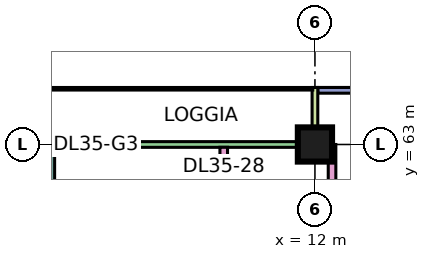
"""IFC4 building model, lengths in metres.
Left out: names, types, materials, properties, quantities, classifications, styles, units other than length and angle.
Written with IfcOpenShell. Run it as: python <this file> out.ifc"""

import sys

from ifc_helpers import new_model, si_unit, direction, frame, frame_2d, origin, origin_2d, place, context, subcontext, project, spatial, rectangle, extrude, element, save


model = new_model("IFC4")
c1 = context("Model", 3, precision=1e-05, world=origin(), true_north=direction((0.0, 1.0)))
c2 = subcontext(c1, "Body", "Model", "MODEL_VIEW")
j1 = project(units=[si_unit("LENGTHUNIT", "METRE"), si_unit("PLANEANGLEUNIT", "RADIAN")], contexts=[c1])
p1 = place(None, origin())
s1 = spatial("IfcSite", under=j1, at=p1, CompositionType="ELEMENT")
p2 = place(p1, origin())
s2 = spatial("IfcBuilding", under=s1, at=p2, CompositionType="ELEMENT")
p3 = place(p2, frame((0.0, 0.0, 157.4)))
s3 = spatial("IfcBuildingStorey", under=s2, at=p3, CompositionType="ELEMENT", Elevation=157.4)
p4 = place(p3, frame((12.0, 63.0, 0.0), z_axis=(0.0, 0.0, 1.0), x_axis=(1.0, 0.0, 0.0)))
e1 = element("IfcColumn", 1, at=p4, inside=s3, PredefinedType="COLUMN", context=c2, shape_type="SweptSolid", body=[
    extrude(rectangle(XDim=0.9, YDim=0.9, at=origin_2d()), origin(), (0.0, 0.0, 1.0), 3.75),
])
p5 = place(p3, frame((22.5, 64.425, 0.0), z_axis=(0.0, 0.0, 1.0), x_axis=(-1.0, 0.0, 0.0)))
e2 = element("IfcWall", 2, at=p5, inside=s3, PredefinedType="SOLIDWALL", context=c2, shape_type="SweptSolid", body=[
    extrude(rectangle(XDim=10.425, YDim=0.15, at=frame_2d((5.212, 0.0))), origin(), (0.0, 0.0, 1.0), 3.35),
])
p6 = place(p5, frame((0.825, 0.0, 0.45)))
e3 = element("IfcOpeningElement", 3, at=p6, cuts=e2, PredefinedType="OPENING", context=c2, shape_type="SweptSolid", body=[
    extrude(rectangle(XDim=3.0, YDim=2.4, at=frame_2d((1.5, 1.2))), frame((0.0, 0.085, 0.0), z_axis=(0.0, -1.0, 0.0), x_axis=(1.0, 0.0, 0.0)), (0.0, 0.0, 1.0), 0.17),
])
p7 = place(p5, frame((5.85, 0.0, 0.45)))
e4 = element("IfcOpeningElement", 4, at=p7, cuts=e2, PredefinedType="OPENING", context=c2, shape_type="SweptSolid", body=[
    extrude(rectangle(XDim=3.0, YDim=2.4, at=frame_2d((1.5, 1.2))), frame((0.0, 0.085, 0.0), z_axis=(0.0, -1.0, 0.0), x_axis=(1.0, 0.0, 0.0)), (0.0, 0.0, 1.0), 0.17),
])
p8 = place(p3, frame((11.925, 63.0, 0.0), z_axis=(0.0, 0.0, 1.0), x_axis=(-1.0, 0.0, 0.0)))
e5 = element("IfcWall", 5, at=p8, inside=s3, PredefinedType="SOLIDWALL", context=c2, shape_type="SweptSolid", body=[
    extrude(rectangle(XDim=10.35, YDim=0.15, at=frame_2d((5.175, 0.0))), origin(), (0.0, 0.0, 1.0), 3.35),
])
p9 = place(p8, frame((7.688, 0.0, 0.0)))
e6 = element("IfcOpeningElement", 6, at=p9, cuts=e5, PredefinedType="OPENING", context=c2, shape_type="SweptSolid", body=[
    extrude(rectangle(XDim=1.8, YDim=2.4, at=frame_2d((0.9, 1.2))), frame((0.0, 0.085, 0.0), z_axis=(0.0, -1.0, 0.0), x_axis=(1.0, 0.0, 0.0)), (0.0, 0.0, 1.0), 0.17),
])
p10 = place(p3, frame((12.0, 64.5, 0.0), z_axis=(0.0, 0.0, 1.0), x_axis=(0.0, -1.0, 0.0)))
e7 = element("IfcWall", 7, at=p10, inside=s3, PredefinedType="SOLIDWALL", context=c2, shape_type="SweptSolid", body=[
    extrude(rectangle(XDim=1.5, YDim=0.15, at=frame_2d((0.75, 0.0))), origin(), (0.0, 0.0, 1.0), 3.35),
])
p11 = place(p3, frame((5.1, 36.1, 0.0), z_axis=(0.0, 0.0, 1.0), x_axis=(0.0, 1.0, 0.0)))
e8 = element("IfcWall", 8, at=p11, inside=s3, PredefinedType="PARTITIONING", context=c2, shape_type="SweptSolid", body=[
    extrude(rectangle(XDim=26.826, YDim=0.1, at=frame_2d((13.413, 0.0))), origin(), (0.0, 0.0, 1.0), 3.35),
])
p12 = place(p11, frame((0.95, 0.0, 0.0)))
e9 = element("IfcOpeningElement", 9, at=p12, cuts=e8, PredefinedType="OPENING", context=c2, shape_type="SweptSolid", body=[
    extrude(rectangle(XDim=0.9, YDim=2.1, at=frame_2d((0.45, 1.05))), frame((0.0, 0.06, 0.0), z_axis=(0.0, -1.0, 0.0), x_axis=(1.0, 0.0, 0.0)), (0.0, 0.0, 1.0), 0.12),
])
p13 = place(p11, frame((3.95, 0.0, 0.0)))
e10 = element("IfcOpeningElement", 10, at=p13, cuts=e8, PredefinedType="OPENING", context=c2, shape_type="SweptSolid", body=[
    extrude(rectangle(XDim=0.9, YDim=2.1, at=frame_2d((0.45, 1.05))), frame((0.0, 0.06, 0.0), z_axis=(0.0, -1.0, 0.0), x_axis=(1.0, 0.0, 0.0)), (0.0, 0.0, 1.0), 0.12),
])
p14 = place(p11, frame((6.95, 0.0, 0.0)))
e11 = element("IfcOpeningElement", 11, at=p14, cuts=e8, PredefinedType="OPENING", context=c2, shape_type="SweptSolid", body=[
    extrude(rectangle(XDim=0.9, YDim=2.1, at=frame_2d((0.45, 1.05))), frame((0.0, 0.06, 0.0), z_axis=(0.0, -1.0, 0.0), x_axis=(1.0, 0.0, 0.0)), (0.0, 0.0, 1.0), 0.12),
])
p15 = place(p11, frame((9.95, 0.0, 0.0)))
e12 = element("IfcOpeningElement", 12, at=p15, cuts=e8, PredefinedType="OPENING", context=c2, shape_type="SweptSolid", body=[
    extrude(rectangle(XDim=0.9, YDim=2.1, at=frame_2d((0.45, 1.05))), frame((0.0, 0.06, 0.0), z_axis=(0.0, -1.0, 0.0), x_axis=(1.0, 0.0, 0.0)), (0.0, 0.0, 1.0), 0.12),
])
p16 = place(p11, frame((21.95, 0.0, 0.0)))
e13 = element("IfcOpeningElement", 13, at=p16, cuts=e8, PredefinedType="OPENING", context=c2, shape_type="SweptSolid", body=[
    extrude(rectangle(XDim=0.9, YDim=2.1, at=frame_2d((0.45, 1.05))), frame((0.0, 0.06, 0.0), z_axis=(0.0, -1.0, 0.0), x_axis=(1.0, 0.0, 0.0)), (0.0, 0.0, 1.0), 0.12),
])
p17 = place(p11, frame((15.95, 0.0, 0.0)))
e14 = element("IfcOpeningElement", 14, at=p17, cuts=e8, PredefinedType="OPENING", context=c2, shape_type="SweptSolid", body=[
    extrude(rectangle(XDim=0.9, YDim=2.1, at=frame_2d((0.45, 1.05))), frame((0.0, 0.06, 0.0), z_axis=(0.0, -1.0, 0.0), x_axis=(1.0, 0.0, 0.0)), (0.0, 0.0, 1.0), 0.12),
])
p18 = place(p11, frame((24.95, 0.0, 0.0)))
e15 = element("IfcOpeningElement", 15, at=p18, cuts=e8, PredefinedType="OPENING", context=c2, shape_type="SweptSolid", body=[
    extrude(rectangle(XDim=0.9, YDim=2.1, at=frame_2d((0.45, 1.05))), frame((0.0, 0.06, 0.0), z_axis=(0.0, -1.0, 0.0), x_axis=(1.0, 0.0, 0.0)), (0.0, 0.0, 1.0), 0.12),
])
p19 = place(p3, frame((9.6, 20.0, 0.0), z_axis=(0.0, 0.0, 1.0), x_axis=(0.0, 1.0, 0.0)))
e16 = element("IfcWall", 16, at=p19, inside=s3, PredefinedType="PARTITIONING", context=c2, shape_type="SweptSolid", body=[
    extrude(rectangle(XDim=42.926, YDim=0.2, at=frame_2d((21.463, 0.0))), origin(), (0.0, 0.0, 1.0), 3.35),
])
p20 = place(p19, frame((40.8, 0.0, 0.0)))
e17 = element("IfcOpeningElement", 17, at=p20, cuts=e16, PredefinedType="OPENING", context=c2, shape_type="SweptSolid", body=[
    extrude(rectangle(XDim=1.0, YDim=2.1, at=frame_2d((0.5, 1.05))), frame((0.0, 0.11, 0.0), z_axis=(0.0, -1.0, 0.0), x_axis=(1.0, 0.0, 0.0)), (0.0, 0.0, 1.0), 0.22),
])
p21 = place(p19, frame((0.6, 0.0, 0.0)))
e18 = element("IfcOpeningElement", 18, at=p21, cuts=e16, PredefinedType="OPENING", context=c2, shape_type="SweptSolid", body=[
    extrude(rectangle(XDim=1.2, YDim=2.1, at=frame_2d((0.6, 1.05))), frame((0.0, 0.11, 0.0), z_axis=(0.0, -1.0, 0.0), x_axis=(1.0, 0.0, 0.0)), (0.0, 0.0, 1.0), 0.22),
])
p22 = place(p19, frame((3.9, 0.0, 0.0)))
e19 = element("IfcOpeningElement", 19, at=p22, cuts=e16, PredefinedType="OPENING", context=c2, shape_type="SweptSolid", body=[
    extrude(rectangle(XDim=1.0, YDim=2.1, at=frame_2d((0.5, 1.05))), frame((0.0, 0.11, 0.0), z_axis=(0.0, -1.0, 0.0), x_axis=(1.0, 0.0, 0.0)), (0.0, 0.0, 1.0), 0.22),
])
p23 = place(p3, frame((12.45, 20.0, 0.0), z_axis=(0.0, 0.0, 1.0), x_axis=(0.0, 1.0, 0.0)))
e20 = element("IfcWall", 20, at=p23, inside=s3, PredefinedType="PARTITIONING", context=c2, shape_type="SweptSolid", body=[
    extrude(rectangle(XDim=43.0, YDim=0.2, at=frame_2d((21.5, 0.0))), origin(), (0.0, 0.0, 1.0), 3.35),
])
p24 = place(p23, frame((5.95, 0.0, 0.0)))
e21 = element("IfcOpeningElement", 21, at=p24, cuts=e20, PredefinedType="OPENING", context=c2, shape_type="SweptSolid", body=[
    extrude(rectangle(XDim=1.0, YDim=2.1, at=frame_2d((0.5, 1.05))), frame((0.0, 0.11, 0.0), z_axis=(0.0, -1.0, 0.0), x_axis=(1.0, 0.0, 0.0)), (0.0, 0.0, 1.0), 0.22),
])
p25 = place(p23, frame((12.0, 0.0, 0.0)))
e22 = element("IfcOpeningElement", 22, at=p25, cuts=e20, PredefinedType="OPENING", context=c2, shape_type="SweptSolid", body=[
    extrude(rectangle(XDim=1.0, YDim=2.1, at=frame_2d((0.5, 1.05))), frame((0.0, 0.11, 0.0), z_axis=(0.0, -1.0, 0.0), x_axis=(1.0, 0.0, 0.0)), (0.0, 0.0, 1.0), 0.22),
])
p26 = place(p23, frame((23.35, 0.0, 0.0)))
e23 = element("IfcOpeningElement", 23, at=p26, cuts=e20, PredefinedType="OPENING", context=c2, shape_type="SweptSolid", body=[
    extrude(rectangle(XDim=1.0, YDim=2.1, at=frame_2d((0.5, 1.05))), frame((0.0, 0.11, 0.0), z_axis=(0.0, -1.0, 0.0), x_axis=(1.0, 0.0, 0.0)), (0.0, 0.0, 1.0), 0.22),
])
p27 = place(p23, frame((35.2, 0.0, 0.0)))
e24 = element("IfcOpeningElement", 24, at=p27, cuts=e20, PredefinedType="OPENING", context=c2, shape_type="SweptSolid", body=[
    extrude(rectangle(XDim=1.0, YDim=2.1, at=frame_2d((0.5, 1.05))), frame((0.0, 0.11, 0.0), z_axis=(0.0, -1.0, 0.0), x_axis=(1.0, 0.0, 0.0)), (0.0, 0.0, 1.0), 0.22),
])
p28 = place(p23, frame((1.15, 0.0, 0.0)))
e25 = element("IfcOpeningElement", 25, at=p28, cuts=e20, PredefinedType="OPENING", context=c2, shape_type="SweptSolid", body=[
    extrude(rectangle(XDim=1.8, YDim=2.1, at=frame_2d((0.9, 1.05))), frame((0.0, 0.11, 0.0), z_axis=(0.0, -1.0, 0.0), x_axis=(1.0, 0.0, 0.0)), (0.0, 0.0, 1.0), 0.22),
])
p29 = place(p23, frame((28.6, 0.0, 0.0)))
e26 = element("IfcOpeningElement", 26, at=p29, cuts=e20, PredefinedType="OPENING", context=c2, shape_type="SweptSolid", body=[
    extrude(rectangle(XDim=1.8, YDim=2.1, at=frame_2d((0.9, 1.05))), frame((0.0, 0.11, 0.0), z_axis=(0.0, -1.0, 0.0), x_axis=(1.0, 0.0, 0.0)), (0.0, 0.0, 1.0), 0.22),
])
save(model, sys.argv[1])
